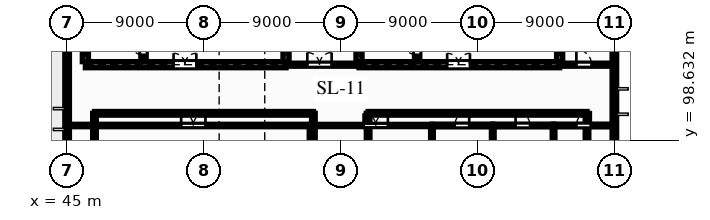
"""IFC4 building model, lengths in metres.
Left out: names, types, materials, properties, quantities, classifications, styles, units other than length and angle.
Written with IfcOpenShell. Run it as: python <this file> out.ifc"""

import sys

from ifc_helpers import new_model, si_unit, direction, frame, frame_2d, origin, place, context, subcontext, project, spatial, polyline, rectangle, outline, extrude, element, fill, save


model = new_model("IFC4")
c1 = context("Model", 3, precision=1e-05, world=origin(), true_north=direction((0.0, 1.0)))
c2 = subcontext(c1, "Body", "Model", "MODEL_VIEW")
j1 = project(units=[si_unit("LENGTHUNIT", "METRE"), si_unit("PLANEANGLEUNIT", "RADIAN")], contexts=[c1])
p1 = place(None, origin())
s1 = spatial("IfcSite", under=j1, at=p1, CompositionType="ELEMENT")
p2 = place(p1, origin())
s2 = spatial("IfcBuilding", under=s1, at=p2, CompositionType="ELEMENT")
p3 = place(p2, frame((0.0, 0.0, 20.26)))
s3 = spatial("IfcBuildingStorey", under=s2, at=p3, CompositionType="ELEMENT", Elevation=20.26)
p4 = place(p3, frame((45.0, 90.0, 0.0), z_axis=(0.0, 0.0, 1.0), x_axis=(0.0, 1.0, 0.0)))
e1 = element("IfcWall", 1, at=p4, inside=s3, PredefinedType="SOLIDWALL", context=c2, shape_type="SweptSolid", body=[
    extrude(rectangle(XDim=24.0, YDim=0.3, at=frame_2d((12.0, 0.0))), origin(), (0.0, 0.0, 1.0), 2.585),
])
p5 = place(p4, frame((3.0, 0.0, 0.615)))
e2 = element("IfcOpeningElement", 2, at=p5, cuts=e1, PredefinedType="OPENING", context=c2, shape_type="SweptSolid", body=[
    extrude(rectangle(XDim=1.35, YDim=1.85, at=frame_2d((0.675, 0.925))), frame((0.0, 0.16, 0.0), z_axis=(0.0, -1.0, 0.0), x_axis=(1.0, 0.0, 0.0)), (0.0, 0.0, 1.0), 0.32),
])
p6 = place(p4, frame((11.7, 0.0, 0.715)))
e3 = element("IfcOpeningElement", 3, at=p6, cuts=e1, PredefinedType="OPENING", context=c2, shape_type="SweptSolid", body=[
    extrude(rectangle(XDim=1.05, YDim=1.75, at=frame_2d((0.525, 0.875))), frame((0.0, 0.16, 0.0), z_axis=(0.0, -1.0, 0.0), x_axis=(1.0, 0.0, 0.0)), (0.0, 0.0, 1.0), 0.32),
])
p7 = place(p4, frame((16.5, 0.0, 0.365)))
e4 = element("IfcOpeningElement", 4, at=p7, cuts=e1, PredefinedType="OPENING", context=c2, shape_type="SweptSolid", body=[
    extrude(rectangle(XDim=1.5, YDim=2.1, at=frame_2d((0.75, 1.05))), frame((0.0, 0.16, 0.0), z_axis=(0.0, -1.0, 0.0), x_axis=(1.0, 0.0, 0.0)), (0.0, 0.0, 1.0), 0.32),
])
p8 = place(p3, frame((81.0, 90.0, 0.0), z_axis=(0.0, 0.0, 1.0), x_axis=(0.0, 1.0, 0.0)))
e5 = element("IfcWall", 5, at=p8, inside=s3, PredefinedType="SOLIDWALL", context=c2, shape_type="SweptSolid", body=[
    extrude(rectangle(XDim=24.0, YDim=0.3, at=frame_2d((12.0, 0.0))), origin(), (0.0, 0.0, 1.0), 2.585),
])
p9 = place(p8, frame((3.2, 0.0, 0.365)))
e6 = element("IfcOpeningElement", 6, at=p9, cuts=e5, PredefinedType="OPENING", context=c2, shape_type="SweptSolid", body=[
    extrude(rectangle(XDim=1.5, YDim=2.1, at=frame_2d((0.75, 1.05))), frame((0.0, 0.16, 0.0), z_axis=(0.0, -1.0, 0.0), x_axis=(1.0, 0.0, 0.0)), (0.0, 0.0, 1.0), 0.32),
])
p10 = place(p8, frame((10.5, 0.0, 0.615)))
e7 = element("IfcOpeningElement", 7, at=p10, cuts=e5, PredefinedType="OPENING", context=c2, shape_type="SweptSolid", body=[
    extrude(rectangle(XDim=1.35, YDim=1.85, at=frame_2d((0.675, 0.925))), frame((0.0, 0.16, 0.0), z_axis=(0.0, -1.0, 0.0), x_axis=(1.0, 0.0, 0.0)), (0.0, 0.0, 1.0), 0.32),
])
p11 = place(p3, frame((46.8, 100.4, 3.64), z_axis=(0.0, 0.0, 1.0), x_axis=(1.0, 0.0, 0.0)))
e8 = element("IfcWall", 8, at=p11, inside=s3, PredefinedType="SOLIDWALL", context=c2, shape_type="SweptSolid", body=[
    extrude(rectangle(XDim=14.4, YDim=0.24, at=frame_2d((7.2, 0.0))), origin(), (0.0, 0.0, 1.0), 0.92),
])
for number, where, z_axis, x_axis in (
    (9, (46.8, 96.2, 3.64), (0.0, 0.0, 1.0), (0.0, 1.0, 0.0)),
    (10, (61.2, 96.2, 3.64), (0.0, 0.0, 1.0), (0.0, 1.0, 0.0)),
):
    element("IfcWall", number, at=place(p3, frame(where, z_axis=z_axis, x_axis=x_axis)), inside=s3, PredefinedType="SOLIDWALL", context=c2, shape_type="SweptSolid", body=[
        extrude(outline(polyline([(0.0, 0.0), (4.2, 0.0), (4.2, 0.92), (0.0, 0.22), (0.0, 0.0)])), frame((0.0, 0.12, 0.0), z_axis=(0.0, -1.0, 0.0), x_axis=(1.0, 0.0, 0.0)), (0.0, 0.0, 1.0), 0.24),
    ])
p12 = place(p3, frame((64.8, 100.4, 3.64), z_axis=(0.0, 0.0, 1.0), x_axis=(1.0, 0.0, 0.0)))
e11 = element("IfcWall", 11, at=p12, inside=s3, PredefinedType="SOLIDWALL", context=c2, shape_type="SweptSolid", body=[
    extrude(rectangle(XDim=14.4, YDim=0.24, at=frame_2d((7.2, 0.0))), origin(), (0.0, 0.0, 1.0), 0.92),
])
for number, where, z_axis, x_axis in (
    (12, (64.8, 96.2, 3.64), (0.0, 0.0, 1.0), (0.0, 1.0, 0.0)),
    (13, (79.2, 96.2, 3.64), (0.0, 0.0, 1.0), (0.0, 1.0, 0.0)),
):
    element("IfcWall", number, at=place(p3, frame(where, z_axis=z_axis, x_axis=x_axis)), inside=s3, PredefinedType="SOLIDWALL", context=c2, shape_type="SweptSolid", body=[
        extrude(outline(polyline([(0.0, 0.0), (4.2, 0.0), (4.2, 0.92), (0.0, 0.22), (0.0, 0.0)])), frame((0.0, 0.12, 0.0), z_axis=(0.0, -1.0, 0.0), x_axis=(1.0, 0.0, 0.0)), (0.0, 0.0, 1.0), 0.24),
    ])
for number, where, z_axis, x_axis in (
    (14, (81.0, 90.22, 3.64), (0.0, 0.0, 1.0), (0.0, 1.0, 0.0)),
    (15, (45.0, 113.78, 3.64), (0.0, 0.0, 1.0), (0.0, -1.0, 0.0)),
):
    element("IfcWall", number, at=place(p3, frame(where, z_axis=z_axis, x_axis=x_axis)), inside=s3, PredefinedType="PARAPET", context=c2, shape_type="SweptSolid", body=[
        extrude(rectangle(XDim=23.56, YDim=0.22, at=frame_2d((11.78, 0.0))), origin(), (0.0, 0.0, 1.0), 0.42),
    ])
p13 = place(p3, frame((46.2, 103.6, 0.0), z_axis=(0.0, 0.0, 1.0), x_axis=(1.0, 0.0, 0.0)))
e16 = element("IfcWall", 16, at=p13, inside=s3, PredefinedType="SHEAR", context=c2, shape_type="SweptSolid", body=[
    extrude(rectangle(XDim=13.2, YDim=0.4, at=frame_2d((6.6, 0.0))), origin(), (0.0, 0.0, 1.0), 3.39),
])
p14 = place(p13, frame((5.8, 0.0, 0.0)))
e17 = element("IfcOpeningElement", 17, at=p14, cuts=e16, PredefinedType="OPENING", context=c2, shape_type="SweptSolid", body=[
    extrude(rectangle(XDim=1.5, YDim=2.2, at=frame_2d((0.75, 1.1))), frame((0.0, 0.21, 0.0), z_axis=(0.0, -1.0, 0.0), x_axis=(1.0, 0.0, 0.0)), (0.0, 0.0, 1.0), 0.42),
])
for number, where, z_axis, x_axis in (
    (18, (46.2, 103.8, 0.0), (0.0, 0.0, 1.0), (0.0, 1.0, 0.0)),
    (19, (59.4, 103.8, 0.0), (0.0, 0.0, 1.0), (0.0, 1.0, 0.0)),
):
    element("IfcWall", number, at=place(p3, frame(where, z_axis=z_axis, x_axis=x_axis)), inside=s3, PredefinedType="SHEAR", context=c2, shape_type="SweptSolid", body=[
        extrude(rectangle(XDim=10.01, YDim=0.4, at=frame_2d((5.005, 0.0))), origin(), (0.0, 0.0, 1.0), 3.39),
    ])
p15 = place(p3, frame((50.025, 103.8, 0.0), z_axis=(0.0, 0.0, 1.0), x_axis=(0.0, 1.0, 0.0)))
e20 = element("IfcWall", 20, at=p15, inside=s3, PredefinedType="SHEAR", context=c2, shape_type="SweptSolid", body=[
    extrude(rectangle(XDim=10.01, YDim=0.35, at=frame_2d((5.005, 0.0))), origin(), (0.0, 0.0, 1.0), 3.39),
])
p16 = place(p15, frame((0.45, 0.0, 0.0)))
e21 = element("IfcOpeningElement", 21, at=p16, cuts=e20, PredefinedType="OPENING", context=c2, shape_type="SweptSolid", body=[
    extrude(rectangle(XDim=1.05, YDim=2.2, at=frame_2d((0.525, 1.1))), frame((0.0, 0.185, 0.0), z_axis=(0.0, -1.0, 0.0), x_axis=(1.0, 0.0, 0.0)), (0.0, 0.0, 1.0), 0.37),
])
p17 = place(p3, frame((64.2, 103.6, 0.0), z_axis=(0.0, 0.0, 1.0), x_axis=(1.0, 0.0, 0.0)))
e22 = element("IfcWall", 22, at=p17, inside=s3, PredefinedType="SHEAR", context=c2, shape_type="SweptSolid", body=[
    extrude(rectangle(XDim=13.2, YDim=0.4, at=frame_2d((6.6, 0.0))), origin(), (0.0, 0.0, 1.0), 3.39),
])
p18 = place(p17, frame((5.8, 0.0, 0.0)))
e23 = element("IfcOpeningElement", 23, at=p18, cuts=e22, PredefinedType="OPENING", context=c2, shape_type="SweptSolid", body=[
    extrude(rectangle(XDim=1.5, YDim=2.2, at=frame_2d((0.75, 1.1))), frame((0.0, 0.21, 0.0), z_axis=(0.0, -1.0, 0.0), x_axis=(1.0, 0.0, 0.0)), (0.0, 0.0, 1.0), 0.42),
])
for number, where, z_axis, x_axis in (
    (24, (64.2, 103.8, 0.0), (0.0, 0.0, 1.0), (0.0, 1.0, 0.0)),
    (25, (77.4, 103.8, 0.0), (0.0, 0.0, 1.0), (0.0, 1.0, 0.0)),
):
    element("IfcWall", number, at=place(p3, frame(where, z_axis=z_axis, x_axis=x_axis)), inside=s3, PredefinedType="SHEAR", context=c2, shape_type="SweptSolid", body=[
        extrude(rectangle(XDim=10.01, YDim=0.4, at=frame_2d((5.005, 0.0))), origin(), (0.0, 0.0, 1.0), 3.39),
    ])
p19 = place(p3, frame((68.025, 103.8, 0.0), z_axis=(0.0, 0.0, 1.0), x_axis=(0.0, 1.0, 0.0)))
e26 = element("IfcWall", 26, at=p19, inside=s3, PredefinedType="SHEAR", context=c2, shape_type="SweptSolid", body=[
    extrude(rectangle(XDim=10.01, YDim=0.35, at=frame_2d((5.005, 0.0))), origin(), (0.0, 0.0, 1.0), 3.39),
])
p20 = place(p19, frame((0.45, 0.0, 0.0)))
e27 = element("IfcOpeningElement", 27, at=p20, cuts=e26, PredefinedType="OPENING", context=c2, shape_type="SweptSolid", body=[
    extrude(rectangle(XDim=1.05, YDim=2.2, at=frame_2d((0.525, 1.1))), frame((0.0, 0.185, 0.0), z_axis=(0.0, -1.0, 0.0), x_axis=(1.0, 0.0, 0.0)), (0.0, 0.0, 1.0), 0.37),
])
p21 = place(p3, frame((45.0, 99.6, 0.0), z_axis=(0.0, 0.0, 1.0), x_axis=(1.0, 0.0, 0.0)))
e28 = element("IfcWall", 28, at=p21, inside=s3, PredefinedType="PARTITIONING", context=c2, shape_type="SweptSolid", body=[
    extrude(rectangle(XDim=16.0, YDim=0.16, at=frame_2d((8.0, 0.0))), origin(), (0.0, 0.0, 1.0), 3.39),
])
p22 = place(p21, frame((7.5, 0.0, 0.0)))
e29 = element("IfcOpeningElement", 29, at=p22, cuts=e28, PredefinedType="OPENING", context=c2, shape_type="SweptSolid", body=[
    extrude(rectangle(XDim=1.6, YDim=2.2, at=frame_2d((0.8, 1.1))), frame((0.0, 0.09, 0.0), z_axis=(0.0, -1.0, 0.0), x_axis=(1.0, 0.0, 0.0)), (0.0, 0.0, 1.0), 0.18),
])
p23 = place(p3, frame((61.0, 99.6, 0.0), z_axis=(0.0, 0.0, 1.0), x_axis=(1.0, 0.0, 0.0)))
e30 = element("IfcWall", 30, at=p23, inside=s3, PredefinedType="PARTITIONING", context=c2, shape_type="SweptSolid", body=[
    extrude(rectangle(XDim=8.0, YDim=0.15, at=frame_2d((4.0, 0.0))), origin(), (0.0, 0.0, 1.0), 3.39),
])
p24 = place(p23, frame((3.5, 0.0, 0.0)))
e31 = element("IfcOpeningElement", 31, at=p24, cuts=e30, PredefinedType="OPENING", context=c2, shape_type="SweptSolid", body=[
    extrude(rectangle(XDim=1.6, YDim=2.2, at=frame_2d((0.8, 1.1))), frame((0.0, 0.085, 0.0), z_axis=(0.0, -1.0, 0.0), x_axis=(1.0, 0.0, 0.0)), (0.0, 0.0, 1.0), 0.17),
])
p25 = place(p3, frame((61.0, 90.0, 0.0), z_axis=(0.0, 0.0, 1.0), x_axis=(0.0, 1.0, 0.0)))
e32 = element("IfcWall", 32, at=p25, inside=s3, PredefinedType="PARTITIONING", context=c2, shape_type="SweptSolid", body=[
    extrude(rectangle(XDim=9.6, YDim=0.15, at=frame_2d((4.8, 0.0))), origin(), (0.0, 0.0, 1.0), 3.39),
])
p26 = place(p3, frame((69.0, 99.6, 0.0), z_axis=(0.0, 0.0, 1.0), x_axis=(1.0, 0.0, 0.0)))
e33 = element("IfcWall", 33, at=p26, inside=s3, PredefinedType="PLUMBINGWALL", context=c2, shape_type="SweptSolid", body=[
    extrude(rectangle(XDim=4.0, YDim=0.18, at=frame_2d((2.0, 0.0))), origin(), (0.0, 0.0, 1.0), 3.39),
])
p27 = place(p26, frame((1.5, 0.0, 0.0)))
e34 = element("IfcOpeningElement", 34, at=p27, cuts=e33, PredefinedType="OPENING", context=c2, shape_type="SweptSolid", body=[
    extrude(rectangle(XDim=0.95, YDim=2.15, at=frame_2d((0.475, 1.075))), frame((0.0, 0.1, 0.0), z_axis=(0.0, -1.0, 0.0), x_axis=(1.0, 0.0, 0.0)), (0.0, 0.0, 1.0), 0.2),
])
p28 = place(p3, frame((69.0, 90.0, 0.0), z_axis=(0.0, 0.0, 1.0), x_axis=(0.0, 1.0, 0.0)))
e35 = element("IfcWall", 35, at=p28, inside=s3, PredefinedType="PLUMBINGWALL", context=c2, shape_type="SweptSolid", body=[
    extrude(rectangle(XDim=9.6, YDim=0.18, at=frame_2d((4.8, 0.0))), origin(), (0.0, 0.0, 1.0), 3.39),
])
p29 = place(p3, frame((73.0, 99.6, 0.0), z_axis=(0.0, 0.0, 1.0), x_axis=(1.0, 0.0, 0.0)))
e36 = element("IfcWall", 36, at=p29, inside=s3, PredefinedType="PLUMBINGWALL", context=c2, shape_type="SweptSolid", body=[
    extrude(rectangle(XDim=4.0, YDim=0.18, at=frame_2d((2.0, 0.0))), origin(), (0.0, 0.0, 1.0), 3.39),
])
p30 = place(p29, frame((1.5, 0.0, 0.0)))
e37 = element("IfcOpeningElement", 37, at=p30, cuts=e36, PredefinedType="OPENING", context=c2, shape_type="SweptSolid", body=[
    extrude(rectangle(XDim=0.95, YDim=2.15, at=frame_2d((0.475, 1.075))), frame((0.0, 0.1, 0.0), z_axis=(0.0, -1.0, 0.0), x_axis=(1.0, 0.0, 0.0)), (0.0, 0.0, 1.0), 0.2),
])
p31 = place(p3, frame((73.0, 90.0, 0.0), z_axis=(0.0, 0.0, 1.0), x_axis=(0.0, 1.0, 0.0)))
e38 = element("IfcWall", 38, at=p31, inside=s3, PredefinedType="PLUMBINGWALL", context=c2, shape_type="SweptSolid", body=[
    extrude(rectangle(XDim=9.6, YDim=0.18, at=frame_2d((4.8, 0.0))), origin(), (0.0, 0.0, 1.0), 3.39),
])
p32 = place(p3, frame((77.0, 99.6, 0.0), z_axis=(0.0, 0.0, 1.0), x_axis=(1.0, 0.0, 0.0)))
e39 = element("IfcWall", 39, at=p32, inside=s3, PredefinedType="PLUMBINGWALL", context=c2, shape_type="SweptSolid", body=[
    extrude(rectangle(XDim=4.0, YDim=0.18, at=frame_2d((2.0, 0.0))), origin(), (0.0, 0.0, 1.0), 3.39),
])
p33 = place(p32, frame((1.5, 0.0, 0.0)))
e40 = element("IfcOpeningElement", 40, at=p33, cuts=e39, PredefinedType="OPENING", context=c2, shape_type="SweptSolid", body=[
    extrude(rectangle(XDim=0.95, YDim=2.15, at=frame_2d((0.475, 1.075))), frame((0.0, 0.1, 0.0), z_axis=(0.0, -1.0, 0.0), x_axis=(1.0, 0.0, 0.0)), (0.0, 0.0, 1.0), 0.2),
])
p34 = place(p3, frame((77.0, 90.0, 0.0), z_axis=(0.0, 0.0, 1.0), x_axis=(0.0, 1.0, 0.0)))
e41 = element("IfcWall", 41, at=p34, inside=s3, PredefinedType="PLUMBINGWALL", context=c2, shape_type="SweptSolid", body=[
    extrude(rectangle(XDim=9.6, YDim=0.18, at=frame_2d((4.8, 0.0))), origin(), (0.0, 0.0, 1.0), 3.39),
])
p35 = place(p3, frame((59.4, 103.6, 0.0), z_axis=(0.0, 0.0, 1.0), x_axis=(1.0, 0.0, 0.0)))
e42 = element("IfcWall", 42, at=p35, inside=s3, PredefinedType="PARTITIONING", context=c2, shape_type="SweptSolid", body=[
    extrude(rectangle(XDim=4.8, YDim=0.2, at=frame_2d((2.4, 0.0))), origin(), (0.0, 0.0, 1.0), 3.39),
])
p36 = place(p35, frame((1.4, 0.0, 0.0)))
e43 = element("IfcOpeningElement", 43, at=p36, cuts=e42, PredefinedType="OPENING", context=c2, shape_type="SweptSolid", body=[
    extrude(rectangle(XDim=1.6, YDim=2.2, at=frame_2d((0.8, 1.1))), frame((0.0, 0.11, 0.0), z_axis=(0.0, -1.0, 0.0), x_axis=(1.0, 0.0, 0.0)), (0.0, 0.0, 1.0), 0.22),
])
p37 = place(p3, frame((77.4, 103.6, 0.0), z_axis=(0.0, 0.0, 1.0), x_axis=(1.0, 0.0, 0.0)))
e44 = element("IfcWall", 44, at=p37, inside=s3, PredefinedType="PARTITIONING", context=c2, shape_type="SweptSolid", body=[
    extrude(rectangle(XDim=3.6, YDim=0.2, at=frame_2d((1.8, 0.0))), origin(), (0.0, 0.0, 1.0), 3.39),
])
p38 = place(p37, frame((1.1, 0.0, 0.0)))
e45 = element("IfcOpeningElement", 45, at=p38, cuts=e44, PredefinedType="OPENING", context=c2, shape_type="SweptSolid", body=[
    extrude(rectangle(XDim=1.0, YDim=2.15, at=frame_2d((0.5, 1.075))), frame((0.0, 0.11, 0.0), z_axis=(0.0, -1.0, 0.0), x_axis=(1.0, 0.0, 0.0)), (0.0, 0.0, 1.0), 0.22),
])
p39 = place(p6, origin())
e46 = element("IfcWindow", 46, at=p39, inside=s3, PartitioningType="SINGLE_PANEL", PredefinedType="WINDOW", context=c2, shape_type="SweptSolid", body=[
    extrude(rectangle(XDim=1.05, YDim=1.75, at=frame_2d((0.525, 0.875))), frame((0.0, 0.03, 0.0), z_axis=(0.0, -1.0, 0.0), x_axis=(1.0, 0.0, 0.0)), (0.0, 0.0, 1.0), 0.06),
])
fill(e3, e46)
p40 = place(p10, origin())
e47 = element("IfcWindow", 47, at=p40, inside=s3, PartitioningType="SINGLE_PANEL", PredefinedType="WINDOW", context=c2, shape_type="SweptSolid", body=[
    extrude(rectangle(XDim=1.35, YDim=1.85, at=frame_2d((0.675, 0.925))), frame((0.0, 0.03, 0.0), z_axis=(0.0, -1.0, 0.0), x_axis=(1.0, 0.0, 0.0)), (0.0, 0.0, 1.0), 0.06),
])
fill(e7, e47)
p41 = place(p14, origin())
e48 = element("IfcDoor", 48, at=p41, inside=s3, OperationType="DOUBLE_DOOR_SINGLE_SWING", PredefinedType="DOOR", context=c2, shape_type="SweptSolid", body=[
    extrude(rectangle(XDim=1.5, YDim=2.2, at=frame_2d((0.75, 1.1))), frame((0.0, 0.025, 0.0), z_axis=(0.0, -1.0, 0.0), x_axis=(1.0, 0.0, 0.0)), (0.0, 0.0, 1.0), 0.05),
])
fill(e17, e48)
p42 = place(p16, origin())
e49 = element("IfcDoor", 49, at=p42, inside=s3, OperationType="SINGLE_SWING_RIGHT", PredefinedType="DOOR", context=c2, shape_type="SweptSolid", body=[
    extrude(rectangle(XDim=1.05, YDim=2.2, at=frame_2d((0.525, 1.1))), frame((0.0, 0.025, 0.0), z_axis=(0.0, -1.0, 0.0), x_axis=(1.0, 0.0, 0.0)), (0.0, 0.0, 1.0), 0.05),
])
fill(e21, e49)
p43 = place(p18, origin())
e50 = element("IfcDoor", 50, at=p43, inside=s3, OperationType="DOUBLE_DOOR_SINGLE_SWING", PredefinedType="DOOR", context=c2, shape_type="SweptSolid", body=[
    extrude(rectangle(XDim=1.5, YDim=2.2, at=frame_2d((0.75, 1.1))), frame((0.0, 0.025, 0.0), z_axis=(0.0, -1.0, 0.0), x_axis=(1.0, 0.0, 0.0)), (0.0, 0.0, 1.0), 0.05),
])
fill(e23, e50)
p44 = place(p20, origin())
e51 = element("IfcDoor", 51, at=p44, inside=s3, OperationType="SINGLE_SWING_RIGHT", PredefinedType="DOOR", context=c2, shape_type="SweptSolid", body=[
    extrude(rectangle(XDim=1.05, YDim=2.2, at=frame_2d((0.525, 1.1))), frame((0.0, 0.025, 0.0), z_axis=(0.0, -1.0, 0.0), x_axis=(1.0, 0.0, 0.0)), (0.0, 0.0, 1.0), 0.05),
])
fill(e27, e51)
p45 = place(p22, origin())
e52 = element("IfcDoor", 52, at=p45, inside=s3, OperationType="DOUBLE_DOOR_SINGLE_SWING", PredefinedType="DOOR", context=c2, shape_type="SweptSolid", body=[
    extrude(rectangle(XDim=1.6, YDim=2.2, at=frame_2d((0.8, 1.1))), frame((0.0, 0.025, 0.0), z_axis=(0.0, -1.0, 0.0), x_axis=(1.0, 0.0, 0.0)), (0.0, 0.0, 1.0), 0.05),
])
fill(e29, e52)
p46 = place(p24, origin())
e53 = element("IfcDoor", 53, at=p46, inside=s3, OperationType="DOUBLE_DOOR_SINGLE_SWING", PredefinedType="DOOR", context=c2, shape_type="SweptSolid", body=[
    extrude(rectangle(XDim=1.6, YDim=2.2, at=frame_2d((0.8, 1.1))), frame((0.0, 0.025, 0.0), z_axis=(0.0, -1.0, 0.0), x_axis=(1.0, 0.0, 0.0)), (0.0, 0.0, 1.0), 0.05),
])
fill(e31, e53)
p47 = place(p27, origin())
e54 = element("IfcDoor", 54, at=p47, inside=s3, OperationType="SINGLE_SWING_RIGHT", PredefinedType="DOOR", context=c2, shape_type="SweptSolid", body=[
    extrude(rectangle(XDim=0.95, YDim=2.15, at=frame_2d((0.475, 1.075))), frame((0.0, 0.025, 0.0), z_axis=(0.0, -1.0, 0.0), x_axis=(1.0, 0.0, 0.0)), (0.0, 0.0, 1.0), 0.05),
])
fill(e34, e54)
p48 = place(p30, origin())
e55 = element("IfcDoor", 55, at=p48, inside=s3, OperationType="SINGLE_SWING_LEFT", PredefinedType="DOOR", context=c2, shape_type="SweptSolid", body=[
    extrude(rectangle(XDim=0.95, YDim=2.15, at=frame_2d((0.475, 1.075))), frame((0.0, 0.025, 0.0), z_axis=(0.0, -1.0, 0.0), x_axis=(1.0, 0.0, 0.0)), (0.0, 0.0, 1.0), 0.05),
])
fill(e37, e55)
p49 = place(p33, origin())
e56 = element("IfcDoor", 56, at=p49, inside=s3, OperationType="SINGLE_SWING_RIGHT", PredefinedType="DOOR", context=c2, shape_type="SweptSolid", body=[
    extrude(rectangle(XDim=0.95, YDim=2.15, at=frame_2d((0.475, 1.075))), frame((0.0, 0.025, 0.0), z_axis=(0.0, -1.0, 0.0), x_axis=(1.0, 0.0, 0.0)), (0.0, 0.0, 1.0), 0.05),
])
fill(e40, e56)
p50 = place(p36, origin())
e57 = element("IfcDoor", 57, at=p50, inside=s3, OperationType="DOUBLE_DOOR_SINGLE_SWING", PredefinedType="DOOR", context=c2, shape_type="SweptSolid", body=[
    extrude(rectangle(XDim=1.6, YDim=2.2, at=frame_2d((0.8, 1.1))), frame((0.0, 0.025, 0.0), z_axis=(0.0, -1.0, 0.0), x_axis=(1.0, 0.0, 0.0)), (0.0, 0.0, 1.0), 0.05),
])
fill(e43, e57)
p51 = place(p38, origin())
e58 = element("IfcDoor", 58, at=p51, inside=s3, OperationType="SINGLE_SWING_LEFT", PredefinedType="DOOR", context=c2, shape_type="SweptSolid", body=[
    extrude(rectangle(XDim=1.0, YDim=2.15, at=frame_2d((0.5, 1.075))), frame((0.0, 0.025, 0.0), z_axis=(0.0, -1.0, 0.0), x_axis=(1.0, 0.0, 0.0)), (0.0, 0.0, 1.0), 0.05),
])
fill(e45, e58)
save(model, sys.argv[1])
